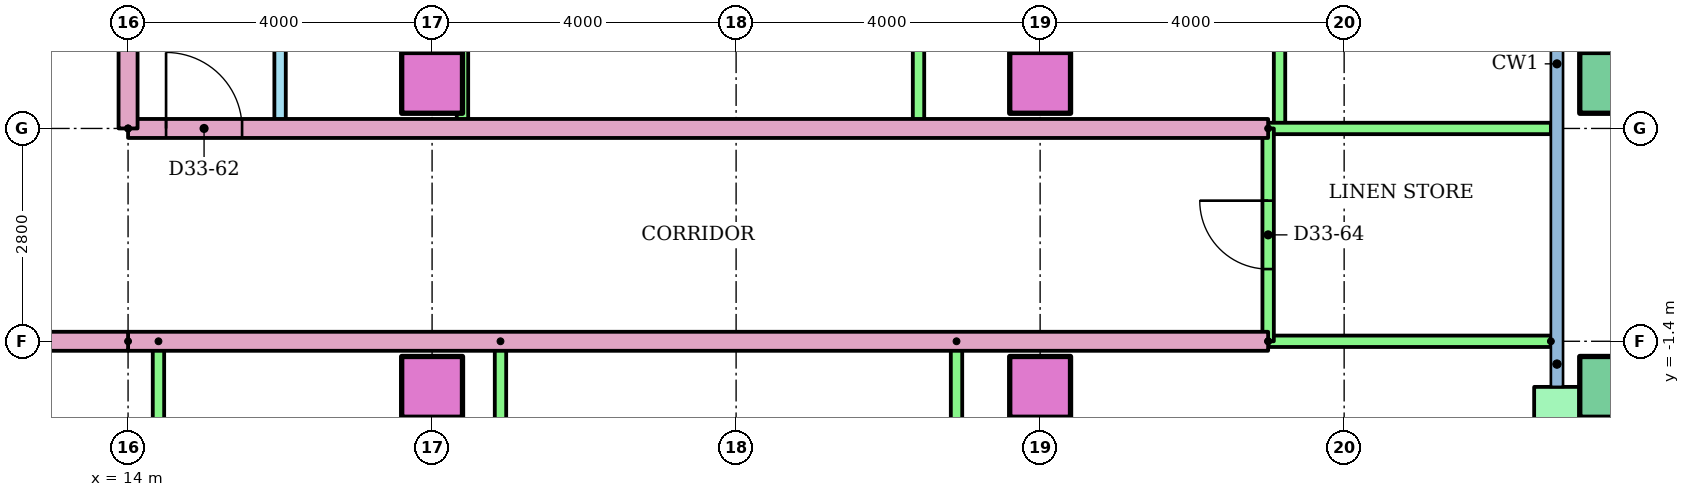
"""IFC4 building model, lengths in metres.
Left out: names, types, materials, properties, quantities, classifications, styles, units other than length and angle.
Written with IfcOpenShell. Run it as: python <this file> out.ifc"""

import sys

from ifc_helpers import new_model, si_unit, direction, frame, frame_2d, origin, origin_2d, place, context, subcontext, project, spatial, rectangle, hollow_rectangle, extrude, element, fill, save


model = new_model("IFC4")
c1 = context("Model", 3, precision=1e-05, world=origin(), true_north=direction((0.0, 1.0)))
c2 = subcontext(c1, "Body", "Model", "MODEL_VIEW")
j1 = project(units=[si_unit("LENGTHUNIT", "METRE"), si_unit("PLANEANGLEUNIT", "RADIAN")], contexts=[c1])
p1 = place(None, origin())
s1 = spatial("IfcSite", under=j1, at=p1, CompositionType="ELEMENT")
p2 = place(p1, origin())
s2 = spatial("IfcBuilding", under=s1, at=p2, CompositionType="ELEMENT")
p3 = place(p2, frame((0.0, 0.0, 129.4)))
s3 = spatial("IfcBuildingStorey", under=s2, at=p3, CompositionType="ELEMENT", Elevation=129.4)
for number, where in (
    (1, (18.0, -2.0, 0.0)),
    (2, (26.0, -2.0, 0.0)),
):
    element("IfcColumn", number, at=place(p3, frame(where)), inside=s3, PredefinedType="COLUMN", context=c2, shape_type="SweptSolid", body=[
        extrude(rectangle(XDim=0.8, YDim=0.8, at=origin_2d()), origin(), (0.0, 0.0, 1.0), 3.2),
    ])
p4 = place(p3, frame((33.5, -2.0, 0.0)))
e3 = element("IfcColumn", 3, at=p4, inside=s3, PredefinedType="COLUMN", context=c2, shape_type="SweptSolid", body=[
    extrude(hollow_rectangle(XDim=0.8, YDim=0.8, WallThickness=0.04, at=origin_2d()), origin(), (0.0, 0.0, 1.0), 3.2),
])
for number, where in (
    (4, (18.0, 2.0, 0.0)),
    (5, (26.0, 2.0, 0.0)),
):
    element("IfcColumn", number, at=place(p3, frame(where)), inside=s3, PredefinedType="COLUMN", context=c2, shape_type="SweptSolid", body=[
        extrude(rectangle(XDim=0.8, YDim=0.8, at=origin_2d()), origin(), (0.0, 0.0, 1.0), 3.2),
    ])
p5 = place(p3, frame((33.5, 2.0, 0.0)))
e6 = element("IfcColumn", 6, at=p5, inside=s3, PredefinedType="COLUMN", context=c2, shape_type="SweptSolid", body=[
    extrude(hollow_rectangle(XDim=0.8, YDim=0.8, WallThickness=0.04, at=origin_2d()), origin(), (0.0, 0.0, 1.0), 3.2),
])
p6 = place(p3, frame((32.8, -5.7, 0.0), z_axis=(0.0, 0.0, 1.0), x_axis=(0.0, 1.0, 0.0)))
e7 = element("IfcWall", 7, at=p6, inside=s3, PredefinedType="STANDARD", context=c2, shape_type="SweptSolid", body=[
    extrude(rectangle(XDim=3.7, YDim=0.6, at=frame_2d((1.85, 0.0))), origin(), (0.0, 0.0, 1.0), 2.92),
])
p7 = place(p6, frame((1.25, 0.0, 0.0)))
e8 = element("IfcOpeningElement", 8, at=p7, cuts=e7, PredefinedType="OPENING", context=c2, shape_type="SweptSolid", body=[
    extrude(rectangle(XDim=1.2, YDim=2.1, at=frame_2d((0.6, 1.05))), frame((0.0, 0.31, 0.0), z_axis=(0.0, -1.0, 0.0), x_axis=(1.0, 0.0, 0.0)), (0.0, 0.0, 1.0), 0.62),
])
for number, where, z_axis, x_axis in (
    (9, (14.4, -1.4, 0.0), (0.0, 0.0, 1.0), (0.0, -1.0, 0.0)),
    (10, (18.9, -1.4, 0.0), (0.0, 0.0, 1.0), (0.0, -1.0, 0.0)),
    (11, (24.9, -1.4, 0.0), (0.0, 0.0, 1.0), (0.0, -1.0, 0.0)),
):
    element("IfcWall", number, at=place(p3, frame(where, z_axis=z_axis, x_axis=x_axis)), inside=s3, PredefinedType="PARTITIONING", context=c2, shape_type="SweptSolid", body=[
        extrude(rectangle(XDim=7.8, YDim=0.15, at=frame_2d((3.9, 0.0))), origin(), (0.0, 0.0, 1.0), 2.4),
    ])
p8 = place(p3, frame((29.0, -1.4, 0.0), z_axis=(0.0, 0.0, 1.0), x_axis=(-1.0, 0.0, 0.0)))
e12 = element("IfcWall", 12, at=p8, inside=s3, PredefinedType="PARTITIONING", context=c2, shape_type="SweptSolid", body=[
    extrude(rectangle(XDim=15.0, YDim=0.25, at=frame_2d((7.5, 0.0))), origin(), (0.0, 0.0, 1.0), 2.4),
])
p9 = place(p3, frame((32.72, -1.4, 0.0), z_axis=(0.0, 0.0, 1.0), x_axis=(-1.0, 0.0, 0.0)))
e13 = element("IfcWall", 13, at=p9, inside=s3, PredefinedType="PARTITIONING", context=c2, shape_type="SweptSolid", body=[
    extrude(rectangle(XDim=3.72, YDim=0.15, at=frame_2d((1.86, 0.0))), origin(), (0.0, 0.0, 1.0), 2.4),
])
p10 = place(p3, frame((16.0, 11.6, 0.0), z_axis=(0.0, 0.0, 1.0), x_axis=(0.0, -1.0, 0.0)))
e14 = element("IfcWall", 14, at=p10, inside=s3, PredefinedType="PARTITIONING", context=c2, shape_type="SweptSolid", body=[
    extrude(rectangle(XDim=10.2, YDim=0.15, at=frame_2d((5.1, 0.0))), origin(), (0.0, 0.0, 1.0), 2.4),
])
p11 = place(p10, frame((7.0, 0.0, 0.0)))
e15 = element("IfcOpeningElement", 15, at=p11, cuts=e14, PredefinedType="OPENING", context=c2, shape_type="SweptSolid", body=[
    extrude(rectangle(XDim=0.9, YDim=2.1, at=frame_2d((0.45, 1.05))), frame((0.0, 0.085, 0.0), z_axis=(0.0, -1.0, 0.0), x_axis=(1.0, 0.0, 0.0)), (0.0, 0.0, 1.0), 0.17),
])
p12 = place(p10, frame((1.95, 0.0, 0.0)))
e16 = element("IfcOpeningElement", 16, at=p12, cuts=e14, PredefinedType="OPENING", context=c2, shape_type="SweptSolid", body=[
    extrude(rectangle(XDim=0.8, YDim=2.1, at=frame_2d((0.4, 1.05))), frame((0.0, 0.085, 0.0), z_axis=(0.0, -1.0, 0.0), x_axis=(1.0, 0.0, 0.0)), (0.0, 0.0, 1.0), 0.17),
])
for number, where, z_axis, x_axis in (
    (17, (18.4, 11.6, 0.0), (0.0, 0.0, 1.0), (0.0, -1.0, 0.0)),
    (18, (24.4, 11.6, 0.0), (0.0, 0.0, 1.0), (0.0, -1.0, 0.0)),
    (19, (29.15, 11.6, 0.0), (0.0, 0.0, 1.0), (0.0, -1.0, 0.0)),
):
    element("IfcWall", number, at=place(p3, frame(where, z_axis=z_axis, x_axis=x_axis)), inside=s3, PredefinedType="PARTITIONING", context=c2, shape_type="SweptSolid", body=[
        extrude(rectangle(XDim=10.2, YDim=0.15, at=frame_2d((5.1, 0.0))), origin(), (0.0, 0.0, 1.0), 2.4),
    ])
p13 = place(p3, frame((14.0, 1.4, 0.0)))
e20 = element("IfcWall", 20, at=p13, inside=s3, PredefinedType="PARTITIONING", context=c2, shape_type="SweptSolid", body=[
    extrude(rectangle(XDim=15.0, YDim=0.25, at=frame_2d((7.5, 0.0))), origin(), (0.0, 0.0, 1.0), 2.4),
])
p14 = place(p13, frame((0.5, 0.0, 0.0)))
e21 = element("IfcOpeningElement", 21, at=p14, cuts=e20, PredefinedType="OPENING", context=c2, shape_type="SweptSolid", body=[
    extrude(rectangle(XDim=1.0, YDim=2.1, at=frame_2d((0.5, 1.05))), frame((0.0, 0.135, 0.0), z_axis=(0.0, -1.0, 0.0), x_axis=(1.0, 0.0, 0.0)), (0.0, 0.0, 1.0), 0.27),
])
p15 = place(p3, frame((29.0, 1.4, 0.0)))
e22 = element("IfcWall", 22, at=p15, inside=s3, PredefinedType="PARTITIONING", context=c2, shape_type="SweptSolid", body=[
    extrude(rectangle(XDim=3.72, YDim=0.15, at=frame_2d((1.86, 0.0))), origin(), (0.0, 0.0, 1.0), 2.4),
])
p16 = place(p3, frame((29.0, -1.4, 0.0), z_axis=(0.0, 0.0, 1.0), x_axis=(0.0, 1.0, 0.0)))
e23 = element("IfcWall", 23, at=p16, inside=s3, PredefinedType="PARTITIONING", context=c2, shape_type="SweptSolid", body=[
    extrude(rectangle(XDim=2.8, YDim=0.15, at=frame_2d((1.4, 0.0))), origin(), (0.0, 0.0, 1.0), 2.4),
])
p17 = place(p16, frame((0.95, 0.0, 0.0)))
e24 = element("IfcOpeningElement", 24, at=p17, cuts=e23, PredefinedType="OPENING", context=c2, shape_type="SweptSolid", body=[
    extrude(rectangle(XDim=0.9, YDim=2.1, at=frame_2d((0.45, 1.05))), frame((0.0, 0.085, 0.0), z_axis=(0.0, -1.0, 0.0), x_axis=(1.0, 0.0, 0.0)), (0.0, 0.0, 1.0), 0.17),
])
p18 = place(p3, frame((14.0, -1.4, 0.0), z_axis=(0.0, 0.0, 1.0), x_axis=(-1.0, 0.0, 0.0)))
e25 = element("IfcWall", 25, at=p18, inside=s3, PredefinedType="PARTITIONING", context=c2, shape_type="SweptSolid", body=[
    extrude(rectangle(XDim=28.0, YDim=0.25, at=frame_2d((14.0, 0.0))), origin(), (0.0, 0.0, 1.0), 2.4),
])
p19 = place(p18, frame((20.618, 0.0, 0.0)))
e26 = element("IfcOpeningElement", 26, at=p19, cuts=e25, PredefinedType="OPENING", context=c2, shape_type="SweptSolid", body=[
    extrude(rectangle(XDim=1.0, YDim=2.1, at=frame_2d((0.5, 1.05))), frame((0.0, 0.135, 0.0), z_axis=(0.0, -1.0, 0.0), x_axis=(1.0, 0.0, 0.0)), (0.0, 0.0, 1.0), 0.27),
])
p20 = place(p18, frame((18.382, 0.0, 0.0)))
e27 = element("IfcOpeningElement", 27, at=p20, cuts=e25, PredefinedType="OPENING", context=c2, shape_type="SweptSolid", body=[
    extrude(rectangle(XDim=1.0, YDim=2.1, at=frame_2d((0.5, 1.05))), frame((0.0, 0.135, 0.0), z_axis=(0.0, -1.0, 0.0), x_axis=(1.0, 0.0, 0.0)), (0.0, 0.0, 1.0), 0.27),
])
p21 = place(p18, frame((2.382, 0.0, 0.0)))
e28 = element("IfcOpeningElement", 28, at=p21, cuts=e25, PredefinedType="OPENING", context=c2, shape_type="SweptSolid", body=[
    extrude(rectangle(XDim=1.0, YDim=2.1, at=frame_2d((0.5, 1.05))), frame((0.0, 0.135, 0.0), z_axis=(0.0, -1.0, 0.0), x_axis=(1.0, 0.0, 0.0)), (0.0, 0.0, 1.0), 0.27),
])
p22 = place(p3, frame((14.0, 1.4, 0.0), z_axis=(0.0, 0.0, 1.0), x_axis=(0.0, 1.0, 0.0)))
e29 = element("IfcWall", 29, at=p22, inside=s3, PredefinedType="PARTITIONING", context=c2, shape_type="SweptSolid", body=[
    extrude(rectangle(XDim=1.6, YDim=0.25, at=frame_2d((0.8, 0.0))), origin(), (0.0, 0.0, 1.0), 2.4),
])
p23 = place(p14, origin())
e30 = element("IfcDoor", 30, at=p23, inside=s3, OperationType="SINGLE_SWING_LEFT", PredefinedType="DOOR", context=c2, shape_type="SweptSolid", body=[
    extrude(rectangle(XDim=1.0, YDim=2.1, at=frame_2d((0.5, 1.05))), frame((0.0, 0.025, 0.0), z_axis=(0.0, -1.0, 0.0), x_axis=(1.0, 0.0, 0.0)), (0.0, 0.0, 1.0), 0.05),
])
fill(e21, e30)
p24 = place(p17, origin())
e31 = element("IfcDoor", 31, at=p24, inside=s3, OperationType="SINGLE_SWING_RIGHT", PredefinedType="DOOR", context=c2, shape_type="SweptSolid", body=[
    extrude(rectangle(XDim=0.9, YDim=2.1, at=frame_2d((0.45, 1.05))), frame((0.0, 0.025, 0.0), z_axis=(0.0, -1.0, 0.0), x_axis=(1.0, 0.0, 0.0)), (0.0, 0.0, 1.0), 0.05),
])
fill(e24, e31)
save(model, sys.argv[1])
